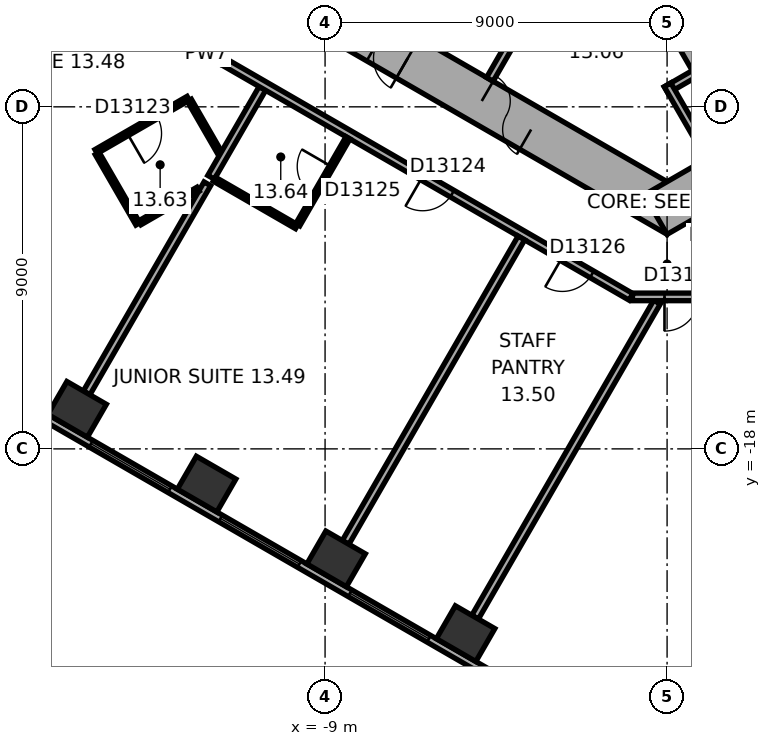
"""IFC4 building model, lengths in metres.
Left out: names, types, materials, properties, quantities, classifications, styles, units other than length and angle.
Written with IfcOpenShell. Run it as: python <this file> out.ifc"""

import sys

from ifc_helpers import new_model, si_unit, direction, frame, frame_2d, origin, origin_2d, place, context, subcontext, project, spatial, rectangle, extrude, element, fill, save


model = new_model("IFC4")
c1 = context("Model", 3, precision=1e-05, world=origin(), true_north=direction((0.0, 1.0)))
c2 = subcontext(c1, "Body", "Model", "MODEL_VIEW")
j1 = project(units=[si_unit("LENGTHUNIT", "METRE"), si_unit("PLANEANGLEUNIT", "RADIAN")], contexts=[c1])
p1 = place(None, origin())
s1 = spatial("IfcSite", under=j1, at=p1, CompositionType="ELEMENT")
p2 = place(p1, origin())
s2 = spatial("IfcBuilding", under=s1, at=p2, CompositionType="ELEMENT")
p3 = place(p2, frame((0.0, 0.0, 63.8)))
s3 = spatial("IfcBuildingStorey", under=s2, at=p3, CompositionType="ELEMENT", Elevation=63.8)
for number, where, z_axis, x_axis in (
    (1, (-15.524, -16.96, 0.0), (0.0, 0.0, 1.0), (0.866, -0.5, 0.0)),
    (2, (-12.117, -18.927, 0.0), (0.0, 0.0, 1.0), (0.866, -0.5, 0.0)),
    (3, (-8.71, -20.895, 0.0), (0.0, 0.0, 1.0), (0.866, -0.5, 0.0)),
    (4, (-5.302, -22.862, 0.0), (0.0, 0.0, 1.0), (0.866, -0.5, 0.0)),
):
    element("IfcColumn", number, at=place(p3, frame(where, z_axis=z_axis, x_axis=x_axis)), inside=s3, PredefinedType="COLUMN", context=c2, shape_type="SweptSolid", body=[
        extrude(rectangle(XDim=1.2, YDim=1.0, at=origin_2d()), origin(), (0.0, 0.0, 1.0), 3.3),
    ])
p4 = place(p3, frame((-10.4, -5.658, 0.0), z_axis=(0.0, 0.0, 1.0), x_axis=(0.866021384402, -0.500006961711, 0.0)))
e5 = element("IfcWall", 5, at=p4, inside=s3, PredefinedType="SHEAR", context=c2, shape_type="SweptSolid", body=[
    extrude(rectangle(XDim=12.355, YDim=1.2, at=frame_2d((6.178, 0.0))), origin(), (0.0, 0.0, 1.0), 3.3),
])
p5 = place(p4, frame((6.378, 0.0, 0.0)))
e6 = element("IfcOpeningElement", 6, at=p5, cuts=e5, PredefinedType="OPENING", context=c2, shape_type="SweptSolid", body=[
    extrude(rectangle(XDim=1.5, YDim=2.1, at=frame_2d((0.75, 1.05))), frame((0.0, 0.61, 0.0), z_axis=(0.0, -1.0, 0.0), x_axis=(1.0, 0.0, 0.0)), (0.0, 0.0, 1.0), 1.22),
])
p6 = place(p4, frame((3.228, 0.0, 0.0)))
e7 = element("IfcOpeningElement", 7, at=p6, cuts=e5, PredefinedType="OPENING", context=c2, shape_type="SweptSolid", body=[
    extrude(rectangle(XDim=0.9, YDim=2.1, at=frame_2d((0.45, 1.05))), frame((0.0, 0.61, 0.0), z_axis=(0.0, -1.0, 0.0), x_axis=(1.0, 0.0, 0.0)), (0.0, 0.0, 1.0), 1.22),
])
p7 = place(p3, frame((-0.3, -11.836, 0.0), z_axis=(0.0, 0.0, 1.0), x_axis=(0.866021384402, 0.500006961711, 0.0)))
e8 = element("IfcWall", 8, at=p7, inside=s3, PredefinedType="SHEAR", context=c2, shape_type="SweptSolid", body=[
    extrude(rectangle(XDim=12.355, YDim=1.2, at=frame_2d((6.178, 0.0))), origin(), (0.0, 0.0, 1.0), 3.3),
])
p8 = place(p7, frame((4.128, 0.0, 0.0)))
e9 = element("IfcOpeningElement", 9, at=p8, cuts=e8, PredefinedType="OPENING", context=c2, shape_type="SweptSolid", body=[
    extrude(rectangle(XDim=0.9, YDim=2.1, at=frame_2d((0.45, 1.05))), frame((0.0, 0.61, 0.0), z_axis=(0.0, -1.0, 0.0), x_axis=(1.0, 0.0, 0.0)), (0.0, 0.0, 1.0), 1.22),
])
p9 = place(p7, frame((7.928, 0.0, 0.0)))
e10 = element("IfcOpeningElement", 10, at=p9, cuts=e8, PredefinedType="OPENING", context=c2, shape_type="SweptSolid", body=[
    extrude(rectangle(XDim=1.1, YDim=2.1, at=frame_2d((0.55, 1.05))), frame((0.0, 0.61, 0.0), z_axis=(0.0, -1.0, 0.0), x_axis=(1.0, 0.0, 0.0)), (0.0, 0.0, 1.0), 1.22),
])
p10 = place(p3, frame((-19.914, -15.119, 0.0), z_axis=(0.0, 0.0, 1.0), x_axis=(0.866025418898, -0.499999973822, 0.0)))
e11 = element("IfcWall", 11, at=p10, inside=s3, PredefinedType="STANDARD", context=c2, shape_type="SweptSolid", body=[
    extrude(rectangle(XDim=21.246, YDim=0.2, at=frame_2d((10.623, 0.0))), origin(), (0.0, 0.0, 1.0), 3.3),
])
p11 = place(p10, frame((1.555, 0.0, 0.8)))
e12 = element("IfcOpeningElement", 12, at=p11, cuts=e11, PredefinedType="OPENING", context=c2, shape_type="SweptSolid", body=[
    extrude(rectangle(XDim=2.4, YDim=1.7, at=frame_2d((1.2, 0.85))), frame((0.0, 0.11, 0.0), z_axis=(0.0, -1.0, 0.0), x_axis=(1.0, 0.0, 0.0)), (0.0, 0.0, 1.0), 0.22),
])
p12 = place(p10, frame((5.489, 0.0, 0.8)))
e13 = element("IfcOpeningElement", 13, at=p12, cuts=e11, PredefinedType="OPENING", context=c2, shape_type="SweptSolid", body=[
    extrude(rectangle(XDim=2.4, YDim=1.7, at=frame_2d((1.2, 0.85))), frame((0.0, 0.11, 0.0), z_axis=(0.0, -1.0, 0.0), x_axis=(1.0, 0.0, 0.0)), (0.0, 0.0, 1.0), 0.22),
])
p13 = place(p10, frame((9.424, 0.0, 0.8)))
e14 = element("IfcOpeningElement", 14, at=p13, cuts=e11, PredefinedType="OPENING", context=c2, shape_type="SweptSolid", body=[
    extrude(rectangle(XDim=2.4, YDim=1.7, at=frame_2d((1.2, 0.85))), frame((0.0, 0.11, 0.0), z_axis=(0.0, -1.0, 0.0), x_axis=(1.0, 0.0, 0.0)), (0.0, 0.0, 1.0), 0.22),
])
p14 = place(p10, frame((13.358, 0.0, 0.8)))
e15 = element("IfcOpeningElement", 15, at=p14, cuts=e11, PredefinedType="OPENING", context=c2, shape_type="SweptSolid", body=[
    extrude(rectangle(XDim=2.4, YDim=1.7, at=frame_2d((1.2, 0.85))), frame((0.0, 0.11, 0.0), z_axis=(0.0, -1.0, 0.0), x_axis=(1.0, 0.0, 0.0)), (0.0, 0.0, 1.0), 0.22),
])
p15 = place(p10, frame((17.293, 0.0, 0.8)))
e16 = element("IfcOpeningElement", 16, at=p15, cuts=e11, PredefinedType="OPENING", context=c2, shape_type="SweptSolid", body=[
    extrude(rectangle(XDim=2.4, YDim=1.7, at=frame_2d((1.2, 0.85))), frame((0.0, 0.11, 0.0), z_axis=(0.0, -1.0, 0.0), x_axis=(1.0, 0.0, 0.0)), (0.0, 0.0, 1.0), 0.22),
])
p16 = place(p3, frame((-3.563, -6.372, 0.0), z_axis=(0.0, 0.0, 1.0), x_axis=(-0.499994660107, -0.866028486751, 0.0)))
e17 = element("IfcWall", 17, at=p16, inside=s3, PredefinedType="PARTITIONING", context=c2, shape_type="SweptSolid", body=[
    extrude(rectangle(XDim=2.2, YDim=0.2, at=frame_2d((1.1, 0.0))), origin(), (0.0, 0.0, 1.0), 3.05),
])
p17 = place(p3, frame((-0.024, -8.559, 0.0), z_axis=(0.0, 0.0, 1.0), x_axis=(0.866026010844, 0.49999894854, 0.0)))
e18 = element("IfcWall", 18, at=p17, inside=s3, PredefinedType="PARTITIONING", context=c2, shape_type="SweptSolid", body=[
    extrude(rectangle(XDim=8.0, YDim=0.2, at=frame_2d((4.0, 0.0))), origin(), (0.0, 0.0, 1.0), 3.05),
])
p18 = place(p3, frame((0.013, -8.422, 0.0), z_axis=(0.0, 0.0, 1.0), x_axis=(0.500077893725, -0.86598042715, 0.0)))
e19 = element("IfcWall", 19, at=p18, inside=s3, PredefinedType="PARTITIONING", context=c2, shape_type="SweptSolid", body=[
    extrude(rectangle(XDim=2.2, YDim=0.2, at=frame_2d((1.1, 0.0))), origin(), (0.0, 0.0, 1.0), 3.05),
])
p19 = place(p3, frame((-1.558, -3.902, 0.0), z_axis=(0.0, 0.0, 1.0), x_axis=(0.499977259774, -0.866038532462, 0.0)))
e20 = element("IfcWall", 20, at=p19, inside=s3, PredefinedType="SHEAR", context=c2, shape_type="SweptSolid", body=[
    extrude(rectangle(XDim=4.7, YDim=0.3, at=frame_2d((2.35, 0.0))), origin(), (0.0, 0.0, 1.0), 3.05),
])
p20 = place(p19, frame((0.8, 0.0, 0.0)))
e21 = element("IfcOpeningElement", 21, at=p20, cuts=e20, PredefinedType="OPENING", context=c2, shape_type="SweptSolid", body=[
    extrude(rectangle(XDim=1.2, YDim=2.1, at=frame_2d((0.6, 1.05))), frame((0.0, 0.16, 0.0), z_axis=(0.0, -1.0, 0.0), x_axis=(1.0, 0.0, 0.0)), (0.0, 0.0, 1.0), 0.32),
])
p21 = place(p3, frame((-15.274, -16.527, 0.0), z_axis=(0.0, 0.0, 1.0), x_axis=(0.499995225238, 0.866028160477, 0.0)))
e22 = element("IfcWall", 22, at=p21, inside=s3, PredefinedType="PARTITIONING", context=c2, shape_type="SweptSolid", body=[
    extrude(rectangle(XDim=6.353, YDim=0.2, at=frame_2d((3.177, 0.0))), origin(), (0.0, 0.0, 1.0), 3.05),
])
p22 = place(p3, frame((-15.026, -10.176, 0.0), z_axis=(0.0, 0.0, 1.0), x_axis=(0.865996816683, 0.500049511043, 0.0)))
e23 = element("IfcWall", 23, at=p22, inside=s3, PredefinedType="PARTITIONING", context=c2, shape_type="SweptSolid", body=[
    extrude(rectangle(XDim=2.8, YDim=0.12, at=frame_2d((1.4, 0.0))), origin(), (0.0, 0.0, 1.0), 3.05),
])
p23 = place(p22, frame((0.95, 0.0, 0.0)))
e24 = element("IfcOpeningElement", 24, at=p23, cuts=e23, PredefinedType="OPENING", context=c2, shape_type="SweptSolid", body=[
    extrude(rectangle(XDim=0.9, YDim=2.1, at=frame_2d((0.45, 1.05))), frame((0.0, 0.07, 0.0), z_axis=(0.0, -1.0, 0.0), x_axis=(1.0, 0.0, 0.0)), (0.0, 0.0, 1.0), 0.14),
])
p24 = place(p3, frame((-13.926, -12.081, 0.0), z_axis=(0.0, 0.0, 1.0), x_axis=(-0.499992422807, 0.866029778435, 0.0)))
e25 = element("IfcWall", 25, at=p24, inside=s3, PredefinedType="PARTITIONING", context=c2, shape_type="SweptSolid", body=[
    extrude(rectangle(XDim=2.14, YDim=0.12, at=frame_2d((1.07, 0.0))), origin(), (0.0, 0.0, 1.0), 3.05),
])
p25 = place(p3, frame((-12.6, -6.177, 0.0), z_axis=(0.0, 0.0, 1.0), x_axis=(0.500063520245, -0.865988727248, 0.0)))
e26 = element("IfcWall", 26, at=p25, inside=s3, PredefinedType="PARTITIONING", context=c2, shape_type="SweptSolid", body=[
    extrude(rectangle(XDim=1.9, YDim=0.2, at=frame_2d((0.95, 0.0))), origin(), (0.0, 0.0, 1.0), 3.05),
])
p26 = place(p25, frame((0.5, 0.0, 0.0)))
e27 = element("IfcOpeningElement", 27, at=p26, cuts=e26, PredefinedType="OPENING", context=c2, shape_type="SweptSolid", body=[
    extrude(rectangle(XDim=0.9, YDim=2.1, at=frame_2d((0.45, 1.05))), frame((0.0, 0.11, 0.0), z_axis=(0.0, -1.0, 0.0), x_axis=(1.0, 0.0, 0.0)), (0.0, 0.0, 1.0), 0.22),
])
p27 = place(p3, frame((-12.571, -8.828, 0.0), z_axis=(0.0, 0.0, 1.0), x_axis=(0.499960029081, -0.866048479775, 0.0)))
e28 = element("IfcWall", 28, at=p27, inside=s3, PredefinedType="PARTITIONING", context=c2, shape_type="SweptSolid", body=[
    extrude(rectangle(XDim=1.601, YDim=0.12, at=frame_2d((0.801, 0.0))), origin(), (0.0, 0.0, 1.0), 3.05),
])
p28 = place(p3, frame((-12.342, -11.167, 0.0), z_axis=(0.0, 0.0, 1.0), x_axis=(-0.865992557167, -0.500056887695, 0.0)))
e29 = element("IfcWall", 29, at=p28, inside=s3, PredefinedType="PARTITIONING", context=c2, shape_type="SweptSolid", body=[
    extrude(rectangle(XDim=1.769, YDim=0.12, at=frame_2d((0.885, 0.0))), origin(), (0.0, 0.0, 1.0), 3.05),
])
p29 = place(p3, frame((-12.0, -10.854, 0.0), z_axis=(0.0, 0.0, 1.0), x_axis=(0.50000943426, 0.866019956843, 0.0)))
e30 = element("IfcWall", 30, at=p29, inside=s3, PredefinedType="PARTITIONING", context=c2, shape_type="SweptSolid", body=[
    extrude(rectangle(XDim=2.7, YDim=0.2, at=frame_2d((1.35, 0.0))), origin(), (0.0, 0.0, 1.0), 3.05),
])
p30 = place(p3, frame((-11.615, -7.843, 0.0), z_axis=(0.0, 0.0, 1.0), x_axis=(0.866026466995, -0.499998158461, 0.0)))
e31 = element("IfcWall", 31, at=p30, inside=s3, PredefinedType="PARTITIONING", context=c2, shape_type="SweptSolid", body=[
    extrude(rectangle(XDim=12.315, YDim=0.2, at=frame_2d((6.158, 0.0))), origin(), (0.0, 0.0, 1.0), 3.05),
])
p31 = place(p30, frame((5.983, 0.0, 0.0)))
e32 = element("IfcOpeningElement", 32, at=p31, cuts=e31, PredefinedType="OPENING", context=c2, shape_type="SweptSolid", body=[
    extrude(rectangle(XDim=0.9, YDim=2.1, at=frame_2d((0.45, 1.05))), frame((0.0, 0.11, 0.0), z_axis=(0.0, -1.0, 0.0), x_axis=(1.0, 0.0, 0.0)), (0.0, 0.0, 1.0), 0.22),
])
p32 = place(p30, frame((10.229, 0.0, 0.0)))
e33 = element("IfcOpeningElement", 33, at=p32, cuts=e31, PredefinedType="OPENING", context=c2, shape_type="SweptSolid", body=[
    extrude(rectangle(XDim=0.9, YDim=2.1, at=frame_2d((0.45, 1.05))), frame((0.0, 0.11, 0.0), z_axis=(0.0, -1.0, 0.0), x_axis=(1.0, 0.0, 0.0)), (0.0, 0.0, 1.0), 0.22),
])
p33 = place(p3, frame((-9.748, -12.155, 0.0), z_axis=(0.0, 0.0, 1.0), x_axis=(-0.866022959057, 0.500004234368, 0.0)))
e34 = element("IfcWall", 34, at=p33, inside=s3, PredefinedType="PARTITIONING", context=c2, shape_type="SweptSolid", body=[
    extrude(rectangle(XDim=2.5, YDim=0.12, at=frame_2d((1.25, 0.0))), origin(), (0.0, 0.0, 1.0), 3.05),
])
p34 = place(p3, frame((-8.46, -20.461, 0.0), z_axis=(0.0, 0.0, 1.0), x_axis=(0.499999662836, 0.866025598446, 0.0)))
e35 = element("IfcWall", 35, at=p34, inside=s3, PredefinedType="PARTITIONING", context=c2, shape_type="SweptSolid", body=[
    extrude(rectangle(XDim=9.25, YDim=0.2, at=frame_2d((4.625, 0.0))), origin(), (0.0, 0.0, 1.0), 3.05),
])
p35 = place(p3, frame((-8.398, -9.816, 0.0), z_axis=(0.0, 0.0, 1.0), x_axis=(-0.500007957085, -0.86602080971, 0.0)))
e36 = element("IfcWall", 36, at=p35, inside=s3, PredefinedType="PARTITIONING", context=c2, shape_type="SweptSolid", body=[
    extrude(rectangle(XDim=2.64, YDim=0.12, at=frame_2d((1.32, 0.0))), origin(), (0.0, 0.0, 1.0), 3.05),
])
p36 = place(p35, frame((0.87, 0.0, 0.0)))
e37 = element("IfcOpeningElement", 37, at=p36, cuts=e36, PredefinedType="OPENING", context=c2, shape_type="SweptSolid", body=[
    extrude(rectangle(XDim=0.9, YDim=2.1, at=frame_2d((0.45, 1.05))), frame((0.0, 0.07, 0.0), z_axis=(0.0, -1.0, 0.0), x_axis=(1.0, 0.0, 0.0)), (0.0, 0.0, 1.0), 0.14),
])
p37 = place(p3, frame((-5.052, -22.429, 0.0), z_axis=(0.0, 0.0, 1.0), x_axis=(0.500004329283, 0.866022904257, 0.0)))
e38 = element("IfcWall", 38, at=p37, inside=s3, PredefinedType="PARTITIONING", context=c2, shape_type="SweptSolid", body=[
    extrude(rectangle(XDim=9.572, YDim=0.2, at=frame_2d((4.786, 0.0))), origin(), (0.0, 0.0, 1.0), 3.05),
])
p38 = place(p3, frame((-0.91, -14.001, 0.0), z_axis=(0.0, 0.0, 1.0), x_axis=(1.0, 0.0, 0.0)))
e39 = element("IfcWall", 39, at=p38, inside=s3, PredefinedType="PARTITIONING", context=c2, shape_type="SweptSolid", body=[
    extrude(rectangle(XDim=1.86, YDim=0.2, at=frame_2d((0.93, 0.0))), origin(), (0.0, 0.0, 1.0), 3.05),
])
p39 = place(p38, frame((0.842, 0.0, 0.0)))
e40 = element("IfcOpeningElement", 40, at=p39, cuts=e39, PredefinedType="OPENING", context=c2, shape_type="SweptSolid", body=[
    extrude(rectangle(XDim=0.9, YDim=2.1, at=frame_2d((0.45, 1.05))), frame((0.0, 0.11, 0.0), z_axis=(0.0, -1.0, 0.0), x_axis=(1.0, 0.0, 0.0)), (0.0, 0.0, 1.0), 0.22),
])
p40 = place(p12, origin())
e41 = element("IfcWindow", 41, at=p40, inside=s3, PartitioningType="SINGLE_PANEL", PredefinedType="WINDOW", context=c2, shape_type="SweptSolid", body=[
    extrude(rectangle(XDim=2.4, YDim=1.7, at=frame_2d((1.2, 0.85))), frame((0.0, 0.03, 0.0), z_axis=(0.0, -1.0, 0.0), x_axis=(1.0, 0.0, 0.0)), (0.0, 0.0, 1.0), 0.06),
])
fill(e13, e41)
p41 = place(p13, origin())
e42 = element("IfcWindow", 42, at=p41, inside=s3, PartitioningType="SINGLE_PANEL", PredefinedType="WINDOW", context=c2, shape_type="SweptSolid", body=[
    extrude(rectangle(XDim=2.4, YDim=1.7, at=frame_2d((1.2, 0.85))), frame((0.0, 0.03, 0.0), z_axis=(0.0, -1.0, 0.0), x_axis=(1.0, 0.0, 0.0)), (0.0, 0.0, 1.0), 0.06),
])
fill(e14, e42)
p42 = place(p14, origin())
e43 = element("IfcWindow", 43, at=p42, inside=s3, PartitioningType="SINGLE_PANEL", PredefinedType="WINDOW", context=c2, shape_type="SweptSolid", body=[
    extrude(rectangle(XDim=2.4, YDim=1.7, at=frame_2d((1.2, 0.85))), frame((0.0, 0.03, 0.0), z_axis=(0.0, -1.0, 0.0), x_axis=(1.0, 0.0, 0.0)), (0.0, 0.0, 1.0), 0.06),
])
fill(e15, e43)
p43 = place(p5, origin())
e44 = element("IfcDoor", 44, at=p43, inside=s3, OperationType="DOUBLE_DOOR_SINGLE_SWING", PredefinedType="DOOR", context=c2, shape_type="SweptSolid", body=[
    extrude(rectangle(XDim=1.5, YDim=2.1, at=frame_2d((0.75, 1.05))), frame((0.0, 0.025, 0.0), z_axis=(0.0, -1.0, 0.0), x_axis=(1.0, 0.0, 0.0)), (0.0, 0.0, 1.0), 0.05),
])
fill(e6, e44)
p44 = place(p6, origin())
e45 = element("IfcDoor", 45, at=p44, inside=s3, OperationType="SINGLE_SWING_LEFT", PredefinedType="DOOR", context=c2, shape_type="SweptSolid", body=[
    extrude(rectangle(XDim=0.9, YDim=2.1, at=frame_2d((0.45, 1.05))), frame((0.0, 0.025, 0.0), z_axis=(0.0, -1.0, 0.0), x_axis=(1.0, 0.0, 0.0)), (0.0, 0.0, 1.0), 0.05),
])
fill(e7, e45)
p45 = place(p23, origin())
e46 = element("IfcDoor", 46, at=p45, inside=s3, OperationType="SINGLE_SWING_LEFT", PredefinedType="DOOR", context=c2, shape_type="SweptSolid", body=[
    extrude(rectangle(XDim=0.9, YDim=2.1, at=frame_2d((0.45, 1.05))), frame((0.0, 0.025, 0.0), z_axis=(0.0, -1.0, 0.0), x_axis=(1.0, 0.0, 0.0)), (0.0, 0.0, 1.0), 0.05),
])
fill(e24, e46)
p46 = place(p31, origin())
e47 = element("IfcDoor", 47, at=p46, inside=s3, OperationType="SINGLE_SWING_LEFT", PredefinedType="DOOR", context=c2, shape_type="SweptSolid", body=[
    extrude(rectangle(XDim=0.9, YDim=2.1, at=frame_2d((0.45, 1.05))), frame((0.0, 0.025, 0.0), z_axis=(0.0, -1.0, 0.0), x_axis=(1.0, 0.0, 0.0)), (0.0, 0.0, 1.0), 0.05),
])
fill(e32, e47)
p47 = place(p36, origin())
e48 = element("IfcDoor", 48, at=p47, inside=s3, OperationType="SINGLE_SWING_LEFT", PredefinedType="DOOR", context=c2, shape_type="SweptSolid", body=[
    extrude(rectangle(XDim=0.9, YDim=2.1, at=frame_2d((0.45, 1.05))), frame((0.0, 0.025, 0.0), z_axis=(0.0, -1.0, 0.0), x_axis=(1.0, 0.0, 0.0)), (0.0, 0.0, 1.0), 0.05),
])
fill(e37, e48)
p48 = place(p32, origin())
e49 = element("IfcDoor", 49, at=p48, inside=s3, OperationType="SINGLE_SWING_LEFT", PredefinedType="DOOR", context=c2, shape_type="SweptSolid", body=[
    extrude(rectangle(XDim=0.9, YDim=2.1, at=frame_2d((0.45, 1.05))), frame((0.0, 0.025, 0.0), z_axis=(0.0, -1.0, 0.0), x_axis=(1.0, 0.0, 0.0)), (0.0, 0.0, 1.0), 0.05),
])
fill(e33, e49)
p49 = place(p39, origin())
e50 = element("IfcDoor", 50, at=p49, inside=s3, OperationType="SINGLE_SWING_LEFT", PredefinedType="DOOR", context=c2, shape_type="SweptSolid", body=[
    extrude(rectangle(XDim=0.9, YDim=2.1, at=frame_2d((0.45, 1.05))), frame((0.0, 0.025, 0.0), z_axis=(0.0, -1.0, 0.0), x_axis=(1.0, 0.0, 0.0)), (0.0, 0.0, 1.0), 0.05),
])
fill(e40, e50)
save(model, sys.argv[1])
